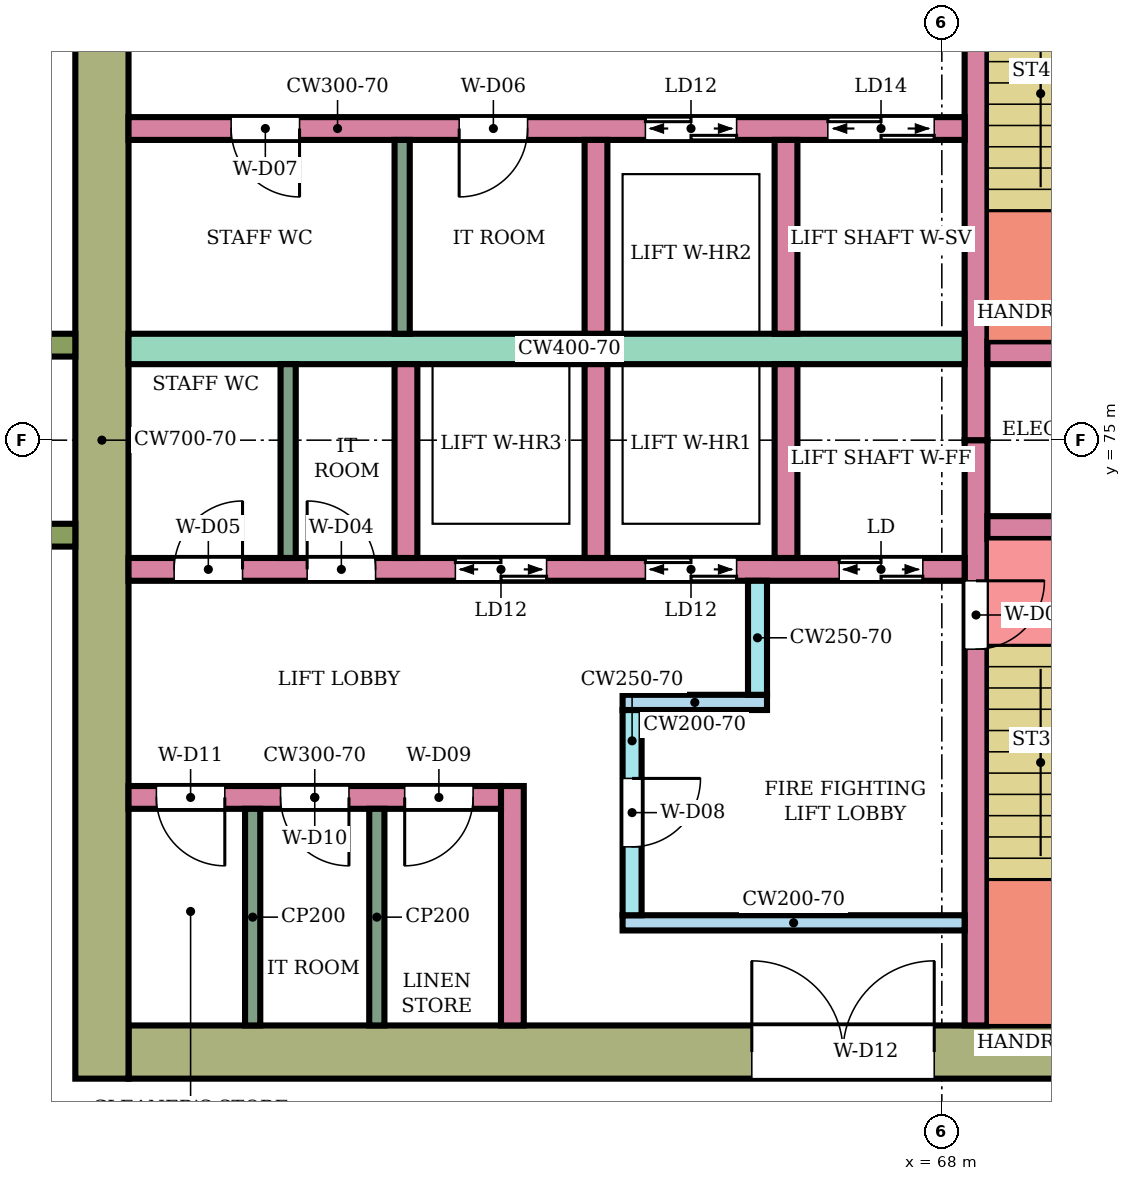
"""IFC4 building model, lengths in metres.
Left out: names, types, materials, properties, quantities, classifications, styles, units other than length and angle.
Written with IfcOpenShell. Run it as: python <this file> out.ifc"""

import sys

from ifc_helpers import new_model, si_unit, direction, frame, frame_2d, origin, place, context, subcontext, project, spatial, rectangle, extrude, element, fill, save


model = new_model("IFC4")
c1 = context("Model", 3, precision=1e-05, world=origin(), true_north=direction((0.0, 1.0)))
c2 = subcontext(c1, "Body", "Model", "MODEL_VIEW")
j1 = project(units=[si_unit("LENGTHUNIT", "METRE"), si_unit("PLANEANGLEUNIT", "RADIAN")], contexts=[c1])
p1 = place(None, origin())
s1 = spatial("IfcSite", under=j1, at=p1, CompositionType="ELEMENT")
p2 = place(p1, origin())
s2 = spatial("IfcBuilding", under=s1, at=p2, CompositionType="ELEMENT")
p3 = place(p2, frame((0.0, 0.0, 174.1)))
s3 = spatial("IfcBuildingStorey", under=s2, at=p3, CompositionType="ELEMENT", Elevation=174.1)
p4 = place(p3, frame((72.1, 66.95, 0.0), z_axis=(0.0, 0.0, 1.0), x_axis=(-1.0, 0.0, 0.0)))
e1 = element("IfcWall", 1, at=p4, inside=s3, PredefinedType="SHEAR", context=c2, shape_type="SweptSolid", body=[
    extrude(rectangle(XDim=14.8, YDim=0.7, at=frame_2d((7.4, 0.0))), origin(), (0.0, 0.0, 1.0), 3.78),
])
p5 = place(p4, frame((4.2, 0.0, 0.0)))
e2 = element("IfcOpeningElement", 2, at=p5, cuts=e1, PredefinedType="OPENING", context=c2, shape_type="SweptSolid", body=[
    extrude(rectangle(XDim=2.4, YDim=2.4, at=frame_2d((1.2, 1.2))), frame((0.0, 0.36, 0.0), z_axis=(0.0, -1.0, 0.0), x_axis=(1.0, 0.0, 0.0)), (0.0, 0.0, 1.0), 0.72),
])
p6 = place(p3, frame((56.95, 83.4, 0.0), z_axis=(0.0, 0.0, 1.0), x_axis=(0.0, -1.0, 0.0)))
e3 = element("IfcWall", 3, at=p6, inside=s3, PredefinedType="SHEAR", context=c2, shape_type="SweptSolid", body=[
    extrude(rectangle(XDim=16.8, YDim=0.7, at=frame_2d((8.4, 0.0))), origin(), (0.0, 0.0, 1.0), 3.78),
])
p7 = place(p3, frame((68.45, 75.0, 0.0), z_axis=(0.0, 0.0, 1.0), x_axis=(0.0, -1.0, 0.0)))
e4 = element("IfcWall", 4, at=p7, inside=s3, PredefinedType="SHEAR", context=c2, shape_type="SweptSolid", body=[
    extrude(rectangle(XDim=7.7, YDim=0.3, at=frame_2d((3.85, 0.0))), origin(), (0.0, 0.0, 1.0), 3.78),
])
p8 = place(p7, frame((1.85, 0.0, 0.0)))
e5 = element("IfcOpeningElement", 5, at=p8, cuts=e4, PredefinedType="OPENING", context=c2, shape_type="SweptSolid", body=[
    extrude(rectangle(XDim=0.9, YDim=2.1, at=frame_2d((0.45, 1.05))), frame((0.0, 0.16, 0.0), z_axis=(0.0, -1.0, 0.0), x_axis=(1.0, 0.0, 0.0)), (0.0, 0.0, 1.0), 0.32),
])
p9 = place(p3, frame((68.45, 82.7, 0.0), z_axis=(0.0, 0.0, 1.0), x_axis=(0.0, -1.0, 0.0)))
e6 = element("IfcWall", 6, at=p9, inside=s3, PredefinedType="SHEAR", context=c2, shape_type="SweptSolid", body=[
    extrude(rectangle(XDim=7.7, YDim=0.3, at=frame_2d((3.85, 0.0))), origin(), (0.0, 0.0, 1.0), 3.78),
])
p10 = place(p9, frame((0.35, 0.0, 0.0)))
e7 = element("IfcOpeningElement", 7, at=p10, cuts=e6, PredefinedType="OPENING", context=c2, shape_type="SweptSolid", body=[
    extrude(rectangle(XDim=0.9, YDim=2.1, at=frame_2d((0.45, 1.05))), frame((0.0, 0.16, 0.0), z_axis=(0.0, -1.0, 0.0), x_axis=(1.0, 0.0, 0.0)), (0.0, 0.0, 1.0), 0.32),
])
p11 = place(p3, frame((71.65, 73.85, 0.0), z_axis=(0.0, 0.0, 1.0), x_axis=(-1.0, 0.0, 0.0)))
e8 = element("IfcWall", 8, at=p11, inside=s3, PredefinedType="SHEAR", context=c2, shape_type="SweptSolid", body=[
    extrude(rectangle(XDim=3.05, YDim=0.3, at=frame_2d((1.525, 0.0))), origin(), (0.0, 0.0, 1.0), 3.78),
])
p12 = place(p11, frame((1.1, 0.0, 0.0)))
e9 = element("IfcOpeningElement", 9, at=p12, cuts=e8, PredefinedType="OPENING", context=c2, shape_type="SweptSolid", body=[
    extrude(rectangle(XDim=0.7, YDim=2.0, at=frame_2d((0.35, 1.0))), frame((0.0, 0.16, 0.0), z_axis=(0.0, -1.0, 0.0), x_axis=(1.0, 0.0, 0.0)), (0.0, 0.0, 1.0), 0.32),
])
p13 = place(p3, frame((71.65, 76.15, 0.0), z_axis=(0.0, 0.0, 1.0), x_axis=(-1.0, 0.0, 0.0)))
e10 = element("IfcWall", 10, at=p13, inside=s3, PredefinedType="SHEAR", context=c2, shape_type="SweptSolid", body=[
    extrude(rectangle(XDim=3.05, YDim=0.3, at=frame_2d((1.525, 0.0))), origin(), (0.0, 0.0, 1.0), 3.78),
])
p14 = place(p3, frame((68.3, 73.3, 0.0), z_axis=(0.0, 0.0, 1.0), x_axis=(-1.0, 0.0, 0.0)))
e11 = element("IfcWall", 11, at=p14, inside=s3, PredefinedType="SHEAR", context=c2, shape_type="SweptSolid", body=[
    extrude(rectangle(XDim=11.0, YDim=0.3, at=frame_2d((5.5, 0.0))), origin(), (0.0, 0.0, 1.0), 3.78),
])
p15 = place(p14, frame((0.55, 0.0, 0.0)))
e12 = element("IfcOpeningElement", 12, at=p15, cuts=e11, PredefinedType="OPENING", context=c2, shape_type="SweptSolid", body=[
    extrude(rectangle(XDim=1.1, YDim=2.1, at=frame_2d((0.55, 1.05))), frame((0.0, 0.16, 0.0), z_axis=(0.0, -1.0, 0.0), x_axis=(1.0, 0.0, 0.0)), (0.0, 0.0, 1.0), 0.32),
])
p16 = place(p14, frame((3.0, 0.0, 0.0)))
e13 = element("IfcOpeningElement", 13, at=p16, cuts=e11, PredefinedType="OPENING", context=c2, shape_type="SweptSolid", body=[
    extrude(rectangle(XDim=1.2, YDim=2.1, at=frame_2d((0.6, 1.05))), frame((0.0, 0.16, 0.0), z_axis=(0.0, -1.0, 0.0), x_axis=(1.0, 0.0, 0.0)), (0.0, 0.0, 1.0), 0.32),
])
p17 = place(p14, frame((5.5, 0.0, 0.0)))
e14 = element("IfcOpeningElement", 14, at=p17, cuts=e11, PredefinedType="OPENING", context=c2, shape_type="SweptSolid", body=[
    extrude(rectangle(XDim=1.2, YDim=2.1, at=frame_2d((0.6, 1.05))), frame((0.0, 0.16, 0.0), z_axis=(0.0, -1.0, 0.0), x_axis=(1.0, 0.0, 0.0)), (0.0, 0.0, 1.0), 0.32),
])
p18 = place(p14, frame((7.75, 0.0, 0.0)))
e15 = element("IfcOpeningElement", 15, at=p18, cuts=e11, PredefinedType="OPENING", context=c2, shape_type="SweptSolid", body=[
    extrude(rectangle(XDim=0.9, YDim=2.1, at=frame_2d((0.45, 1.05))), frame((0.0, 0.16, 0.0), z_axis=(0.0, -1.0, 0.0), x_axis=(1.0, 0.0, 0.0)), (0.0, 0.0, 1.0), 0.32),
])
p19 = place(p14, frame((9.5, 0.0, 0.0)))
e16 = element("IfcOpeningElement", 16, at=p19, cuts=e11, PredefinedType="OPENING", context=c2, shape_type="SweptSolid", body=[
    extrude(rectangle(XDim=0.9, YDim=2.1, at=frame_2d((0.45, 1.05))), frame((0.0, 0.16, 0.0), z_axis=(0.0, -1.0, 0.0), x_axis=(1.0, 0.0, 0.0)), (0.0, 0.0, 1.0), 0.32),
])
p20 = place(p3, frame((68.3, 76.2, 0.0), z_axis=(0.0, 0.0, 1.0), x_axis=(-1.0, 0.0, 0.0)))
e17 = element("IfcWall", 17, at=p20, inside=s3, PredefinedType="SHEAR", context=c2, shape_type="SweptSolid", body=[
    extrude(rectangle(XDim=11.0, YDim=0.4, at=frame_2d((5.5, 0.0))), origin(), (0.0, 0.0, 1.0), 3.78),
])
p21 = place(p3, frame((68.3, 79.1, 0.0), z_axis=(0.0, 0.0, 1.0), x_axis=(-1.0, 0.0, 0.0)))
e18 = element("IfcWall", 18, at=p21, inside=s3, PredefinedType="SHEAR", context=c2, shape_type="SweptSolid", body=[
    extrude(rectangle(XDim=11.0, YDim=0.3, at=frame_2d((5.5, 0.0))), origin(), (0.0, 0.0, 1.0), 3.78),
])
p22 = place(p21, frame((0.4, 0.0, 0.0)))
e19 = element("IfcOpeningElement", 19, at=p22, cuts=e18, PredefinedType="OPENING", context=c2, shape_type="SweptSolid", body=[
    extrude(rectangle(XDim=1.4, YDim=2.1, at=frame_2d((0.7, 1.05))), frame((0.0, 0.16, 0.0), z_axis=(0.0, -1.0, 0.0), x_axis=(1.0, 0.0, 0.0)), (0.0, 0.0, 1.0), 0.32),
])
p23 = place(p21, frame((3.0, 0.0, 0.0)))
e20 = element("IfcOpeningElement", 20, at=p23, cuts=e18, PredefinedType="OPENING", context=c2, shape_type="SweptSolid", body=[
    extrude(rectangle(XDim=1.2, YDim=2.1, at=frame_2d((0.6, 1.05))), frame((0.0, 0.16, 0.0), z_axis=(0.0, -1.0, 0.0), x_axis=(1.0, 0.0, 0.0)), (0.0, 0.0, 1.0), 0.32),
])
p24 = place(p21, frame((5.75, 0.0, 0.0)))
e21 = element("IfcOpeningElement", 21, at=p24, cuts=e18, PredefinedType="OPENING", context=c2, shape_type="SweptSolid", body=[
    extrude(rectangle(XDim=0.9, YDim=2.1, at=frame_2d((0.45, 1.05))), frame((0.0, 0.16, 0.0), z_axis=(0.0, -1.0, 0.0), x_axis=(1.0, 0.0, 0.0)), (0.0, 0.0, 1.0), 0.32),
])
p25 = place(p21, frame((8.75, 0.0, 0.0)))
e22 = element("IfcOpeningElement", 22, at=p25, cuts=e18, PredefinedType="OPENING", context=c2, shape_type="SweptSolid", body=[
    extrude(rectangle(XDim=0.9, YDim=2.1, at=frame_2d((0.45, 1.05))), frame((0.0, 0.16, 0.0), z_axis=(0.0, -1.0, 0.0), x_axis=(1.0, 0.0, 0.0)), (0.0, 0.0, 1.0), 0.32),
])
for number, where, z_axis, x_axis in (
    (23, (65.95, 76.0, 0.0), (0.0, 0.0, 1.0), (0.0, -1.0, 0.0)),
    (24, (63.45, 76.0, 0.0), (0.0, 0.0, 1.0), (0.0, -1.0, 0.0)),
    (25, (60.95, 76.0, 0.0), (0.0, 0.0, 1.0), (0.0, -1.0, 0.0)),
    (26, (65.95, 78.95, 0.0), (0.0, 0.0, 1.0), (0.0, -1.0, 0.0)),
    (27, (63.45, 78.95, 0.0), (0.0, 0.0, 1.0), (0.0, -1.0, 0.0)),
):
    element("IfcWall", number, at=place(p3, frame(where, z_axis=z_axis, x_axis=x_axis)), inside=s3, PredefinedType="SHEAR", context=c2, shape_type="SweptSolid", body=[
        extrude(rectangle(XDim=2.55, YDim=0.3, at=frame_2d((1.275, 0.0))), origin(), (0.0, 0.0, 1.0), 3.78),
    ])
p26 = place(p3, frame((68.3, 68.65, 0.0), z_axis=(0.0, 0.0, 1.0), x_axis=(-1.0, 0.0, 0.0)))
e28 = element("IfcWall", 28, at=p26, inside=s3, PredefinedType="SHEAR", context=c2, shape_type="SweptSolid", body=[
    extrude(rectangle(XDim=4.5, YDim=0.2, at=frame_2d((2.25, 0.0))), origin(), (0.0, 0.0, 1.0), 3.78),
])
p27 = place(p3, frame((63.925, 71.45, 0.0), z_axis=(0.0, 0.0, 1.0), x_axis=(0.0, -1.0, 0.0)))
e29 = element("IfcWall", 29, at=p27, inside=s3, PredefinedType="SHEAR", context=c2, shape_type="SweptSolid", body=[
    extrude(rectangle(XDim=2.7, YDim=0.25, at=frame_2d((1.35, 0.0))), origin(), (0.0, 0.0, 1.0), 3.78),
])
p28 = place(p27, frame((0.9, 0.0, 0.0)))
e30 = element("IfcOpeningElement", 30, at=p28, cuts=e29, PredefinedType="OPENING", context=c2, shape_type="SweptSolid", body=[
    extrude(rectangle(XDim=0.9, YDim=2.1, at=frame_2d((0.45, 1.05))), frame((0.0, 0.135, 0.0), z_axis=(0.0, -1.0, 0.0), x_axis=(1.0, 0.0, 0.0)), (0.0, 0.0, 1.0), 0.27),
])
p29 = place(p3, frame((65.7, 71.55, 0.0), z_axis=(0.0, 0.0, 1.0), x_axis=(-1.0, 0.0, 0.0)))
e31 = element("IfcWall", 31, at=p29, inside=s3, PredefinedType="SHEAR", context=c2, shape_type="SweptSolid", body=[
    extrude(rectangle(XDim=1.9, YDim=0.2, at=frame_2d((0.95, 0.0))), origin(), (0.0, 0.0, 1.0), 3.78),
])
p30 = place(p3, frame((65.575, 73.15, 0.0), z_axis=(0.0, 0.0, 1.0), x_axis=(0.0, -1.0, 0.0)))
e32 = element("IfcWall", 32, at=p30, inside=s3, PredefinedType="SHEAR", context=c2, shape_type="SweptSolid", body=[
    extrude(rectangle(XDim=1.5, YDim=0.25, at=frame_2d((0.75, 0.0))), origin(), (0.0, 0.0, 1.0), 3.78),
])
p31 = place(p3, frame((62.35, 70.45, 0.0), z_axis=(0.0, 0.0, 1.0), x_axis=(0.0, -1.0, 0.0)))
e33 = element("IfcWall", 33, at=p31, inside=s3, PredefinedType="SHEAR", context=c2, shape_type="SweptSolid", body=[
    extrude(rectangle(XDim=3.15, YDim=0.3, at=frame_2d((1.575, 0.0))), origin(), (0.0, 0.0, 1.0), 3.78),
])
p32 = place(p3, frame((62.2, 70.3, 0.0), z_axis=(0.0, 0.0, 1.0), x_axis=(-1.0, 0.0, 0.0)))
e34 = element("IfcWall", 34, at=p32, inside=s3, PredefinedType="SHEAR", context=c2, shape_type="SweptSolid", body=[
    extrude(rectangle(XDim=4.9, YDim=0.3, at=frame_2d((2.45, 0.0))), origin(), (0.0, 0.0, 1.0), 3.78),
])
p33 = place(p32, frame((0.367, 0.0, 0.0)))
e35 = element("IfcOpeningElement", 35, at=p33, cuts=e34, PredefinedType="OPENING", context=c2, shape_type="SweptSolid", body=[
    extrude(rectangle(XDim=0.9, YDim=2.1, at=frame_2d((0.45, 1.05))), frame((0.0, 0.16, 0.0), z_axis=(0.0, -1.0, 0.0), x_axis=(1.0, 0.0, 0.0)), (0.0, 0.0, 1.0), 0.32),
])
p34 = place(p32, frame((2.0, 0.0, 0.0)))
e36 = element("IfcOpeningElement", 36, at=p34, cuts=e34, PredefinedType="OPENING", context=c2, shape_type="SweptSolid", body=[
    extrude(rectangle(XDim=0.9, YDim=2.1, at=frame_2d((0.45, 1.05))), frame((0.0, 0.16, 0.0), z_axis=(0.0, -1.0, 0.0), x_axis=(1.0, 0.0, 0.0)), (0.0, 0.0, 1.0), 0.32),
])
p35 = place(p32, frame((3.633, 0.0, 0.0)))
e37 = element("IfcOpeningElement", 37, at=p35, cuts=e34, PredefinedType="OPENING", context=c2, shape_type="SweptSolid", body=[
    extrude(rectangle(XDim=0.9, YDim=2.1, at=frame_2d((0.45, 1.05))), frame((0.0, 0.16, 0.0), z_axis=(0.0, -1.0, 0.0), x_axis=(1.0, 0.0, 0.0)), (0.0, 0.0, 1.0), 0.32),
])
for number, where, z_axis, x_axis in (
    (38, (56.6, 76.25, 0.0), (0.0, 0.0, 1.0), (-1.0, 0.0, 0.0)),
    (39, (56.6, 73.75, 0.0), (0.0, 0.0, 1.0), (-1.0, 0.0, 0.0)),
):
    element("IfcWall", number, at=place(p3, frame(where, z_axis=z_axis, x_axis=x_axis)), inside=s3, PredefinedType="NOTDEFINED", context=c2, shape_type="SweptSolid", body=[
        extrude(rectangle(XDim=2.416, YDim=0.3, at=frame_2d((1.208, 0.0))), origin(), (0.0, 0.0, 1.0), 4.1),
    ])
for number, where, z_axis, x_axis in (
    (40, (59.4, 76.0, 0.0), (0.0, 0.0, 1.0), (0.0, -1.0, 0.0)),
    (41, (60.9, 78.95, 0.0), (0.0, 0.0, 1.0), (0.0, -1.0, 0.0)),
):
    element("IfcWall", number, at=place(p3, frame(where, z_axis=z_axis, x_axis=x_axis)), inside=s3, PredefinedType="PARTITIONING", context=c2, shape_type="SweptSolid", body=[
        extrude(rectangle(XDim=2.55, YDim=0.2, at=frame_2d((1.275, 0.0))), origin(), (0.0, 0.0, 1.0), 3.78),
    ])
for number, where, z_axis, x_axis in (
    (42, (60.567, 70.15, 0.0), (0.0, 0.0, 1.0), (0.0, -1.0, 0.0)),
    (43, (58.933, 70.15, 0.0), (0.0, 0.0, 1.0), (0.0, -1.0, 0.0)),
):
    element("IfcWall", number, at=place(p3, frame(where, z_axis=z_axis, x_axis=x_axis)), inside=s3, PredefinedType="PARTITIONING", context=c2, shape_type="SweptSolid", body=[
        extrude(rectangle(XDim=2.85, YDim=0.2, at=frame_2d((1.425, 0.0))), origin(), (0.0, 0.0, 1.0), 3.78),
    ])
p36 = place(p8, origin())
e44 = element("IfcDoor", 44, at=p36, inside=s3, OperationType="SINGLE_SWING_LEFT", PredefinedType="DOOR", context=c2, shape_type="SweptSolid", body=[
    extrude(rectangle(XDim=0.9, YDim=2.1, at=frame_2d((0.45, 1.05))), frame((0.0, 0.025, 0.0), z_axis=(0.0, -1.0, 0.0), x_axis=(1.0, 0.0, 0.0)), (0.0, 0.0, 1.0), 0.05),
])
fill(e5, e44)
p37 = place(p15, origin())
e45 = element("IfcDoor", 45, at=p37, inside=s3, OperationType="DOUBLE_DOOR_SLIDING", PredefinedType="DOOR", context=c2, shape_type="SweptSolid", body=[
    extrude(rectangle(XDim=1.1, YDim=2.1, at=frame_2d((0.55, 1.05))), frame((0.0, 0.025, 0.0), z_axis=(0.0, -1.0, 0.0), x_axis=(1.0, 0.0, 0.0)), (0.0, 0.0, 1.0), 0.05),
])
fill(e12, e45)
p38 = place(p16, origin())
e46 = element("IfcDoor", 46, at=p38, inside=s3, OperationType="DOUBLE_DOOR_SLIDING", PredefinedType="DOOR", context=c2, shape_type="SweptSolid", body=[
    extrude(rectangle(XDim=1.2, YDim=2.1, at=frame_2d((0.6, 1.05))), frame((0.0, 0.025, 0.0), z_axis=(0.0, -1.0, 0.0), x_axis=(1.0, 0.0, 0.0)), (0.0, 0.0, 1.0), 0.05),
])
fill(e13, e46)
p39 = place(p17, origin())
e47 = element("IfcDoor", 47, at=p39, inside=s3, OperationType="DOUBLE_DOOR_SLIDING", PredefinedType="DOOR", context=c2, shape_type="SweptSolid", body=[
    extrude(rectangle(XDim=1.2, YDim=2.1, at=frame_2d((0.6, 1.05))), frame((0.0, 0.025, 0.0), z_axis=(0.0, -1.0, 0.0), x_axis=(1.0, 0.0, 0.0)), (0.0, 0.0, 1.0), 0.05),
])
fill(e14, e47)
p40 = place(p18, frame((0.9, 0.0, 0.0), z_axis=(0.0, 0.0, 1.0), x_axis=(-1.0, 0.0, 0.0)))
e48 = element("IfcDoor", 48, at=p40, inside=s3, OperationType="SINGLE_SWING_LEFT", PredefinedType="DOOR", context=c2, shape_type="SweptSolid", body=[
    extrude(rectangle(XDim=0.9, YDim=2.1, at=frame_2d((0.45, 1.05))), frame((0.0, 0.025, 0.0), z_axis=(0.0, -1.0, 0.0), x_axis=(1.0, 0.0, 0.0)), (0.0, 0.0, 1.0), 0.05),
])
fill(e15, e48)
p41 = place(p19, frame((0.9, 0.0, 0.0), z_axis=(0.0, 0.0, 1.0), x_axis=(-1.0, 0.0, 0.0)))
e49 = element("IfcDoor", 49, at=p41, inside=s3, OperationType="SINGLE_SWING_RIGHT", PredefinedType="DOOR", context=c2, shape_type="SweptSolid", body=[
    extrude(rectangle(XDim=0.9, YDim=2.1, at=frame_2d((0.45, 1.05))), frame((0.0, 0.025, 0.0), z_axis=(0.0, -1.0, 0.0), x_axis=(1.0, 0.0, 0.0)), (0.0, 0.0, 1.0), 0.05),
])
fill(e16, e49)
p42 = place(p22, origin())
e50 = element("IfcDoor", 50, at=p42, inside=s3, OperationType="DOUBLE_DOOR_SLIDING", PredefinedType="DOOR", context=c2, shape_type="SweptSolid", body=[
    extrude(rectangle(XDim=1.4, YDim=2.1, at=frame_2d((0.7, 1.05))), frame((0.0, 0.025, 0.0), z_axis=(0.0, -1.0, 0.0), x_axis=(1.0, 0.0, 0.0)), (0.0, 0.0, 1.0), 0.05),
])
fill(e19, e50)
p43 = place(p23, origin())
e51 = element("IfcDoor", 51, at=p43, inside=s3, OperationType="DOUBLE_DOOR_SLIDING", PredefinedType="DOOR", context=c2, shape_type="SweptSolid", body=[
    extrude(rectangle(XDim=1.2, YDim=2.1, at=frame_2d((0.6, 1.05))), frame((0.0, 0.025, 0.0), z_axis=(0.0, -1.0, 0.0), x_axis=(1.0, 0.0, 0.0)), (0.0, 0.0, 1.0), 0.05),
])
fill(e20, e51)
p44 = place(p24, origin())
e52 = element("IfcDoor", 52, at=p44, inside=s3, OperationType="SINGLE_SWING_RIGHT", PredefinedType="DOOR", context=c2, shape_type="SweptSolid", body=[
    extrude(rectangle(XDim=0.9, YDim=2.1, at=frame_2d((0.45, 1.05))), frame((0.0, 0.025, 0.0), z_axis=(0.0, -1.0, 0.0), x_axis=(1.0, 0.0, 0.0)), (0.0, 0.0, 1.0), 0.05),
])
fill(e21, e52)
p45 = place(p25, origin())
e53 = element("IfcDoor", 53, at=p45, inside=s3, OperationType="SINGLE_SWING_LEFT", PredefinedType="DOOR", context=c2, shape_type="SweptSolid", body=[
    extrude(rectangle(XDim=0.9, YDim=2.1, at=frame_2d((0.45, 1.05))), frame((0.0, 0.025, 0.0), z_axis=(0.0, -1.0, 0.0), x_axis=(1.0, 0.0, 0.0)), (0.0, 0.0, 1.0), 0.05),
])
fill(e22, e53)
p46 = place(p28, origin())
e54 = element("IfcDoor", 54, at=p46, inside=s3, OperationType="SINGLE_SWING_LEFT", PredefinedType="DOOR", context=c2, shape_type="SweptSolid", body=[
    extrude(rectangle(XDim=0.9, YDim=2.1, at=frame_2d((0.45, 1.05))), frame((0.0, 0.025, 0.0), z_axis=(0.0, -1.0, 0.0), x_axis=(1.0, 0.0, 0.0)), (0.0, 0.0, 1.0), 0.05),
])
fill(e30, e54)
p47 = place(p33, origin())
e55 = element("IfcDoor", 55, at=p47, inside=s3, OperationType="SINGLE_SWING_RIGHT", PredefinedType="DOOR", context=c2, shape_type="SweptSolid", body=[
    extrude(rectangle(XDim=0.9, YDim=2.1, at=frame_2d((0.45, 1.05))), frame((0.0, 0.025, 0.0), z_axis=(0.0, -1.0, 0.0), x_axis=(1.0, 0.0, 0.0)), (0.0, 0.0, 1.0), 0.05),
])
fill(e35, e55)
p48 = place(p34, origin())
e56 = element("IfcDoor", 56, at=p48, inside=s3, OperationType="SINGLE_SWING_LEFT", PredefinedType="DOOR", context=c2, shape_type="SweptSolid", body=[
    extrude(rectangle(XDim=0.9, YDim=2.1, at=frame_2d((0.45, 1.05))), frame((0.0, 0.025, 0.0), z_axis=(0.0, -1.0, 0.0), x_axis=(1.0, 0.0, 0.0)), (0.0, 0.0, 1.0), 0.05),
])
fill(e36, e56)
p49 = place(p35, origin())
e57 = element("IfcDoor", 57, at=p49, inside=s3, OperationType="SINGLE_SWING_LEFT", PredefinedType="DOOR", context=c2, shape_type="SweptSolid", body=[
    extrude(rectangle(XDim=0.9, YDim=2.1, at=frame_2d((0.45, 1.05))), frame((0.0, 0.025, 0.0), z_axis=(0.0, -1.0, 0.0), x_axis=(1.0, 0.0, 0.0)), (0.0, 0.0, 1.0), 0.05),
])
fill(e37, e57)
p50 = place(p5, frame((2.4, 0.0, 0.0), z_axis=(0.0, 0.0, 1.0), x_axis=(-1.0, 0.0, 0.0)))
e58 = element("IfcDoor", 58, at=p50, inside=s3, OperationType="DOUBLE_DOOR_SINGLE_SWING", PredefinedType="DOOR", context=c2, shape_type="SweptSolid", body=[
    extrude(rectangle(XDim=2.4, YDim=2.4, at=frame_2d((1.2, 1.2))), frame((0.0, 0.025, 0.0), z_axis=(0.0, -1.0, 0.0), x_axis=(1.0, 0.0, 0.0)), (0.0, 0.0, 1.0), 0.05),
])
fill(e2, e58)
save(model, sys.argv[1])
